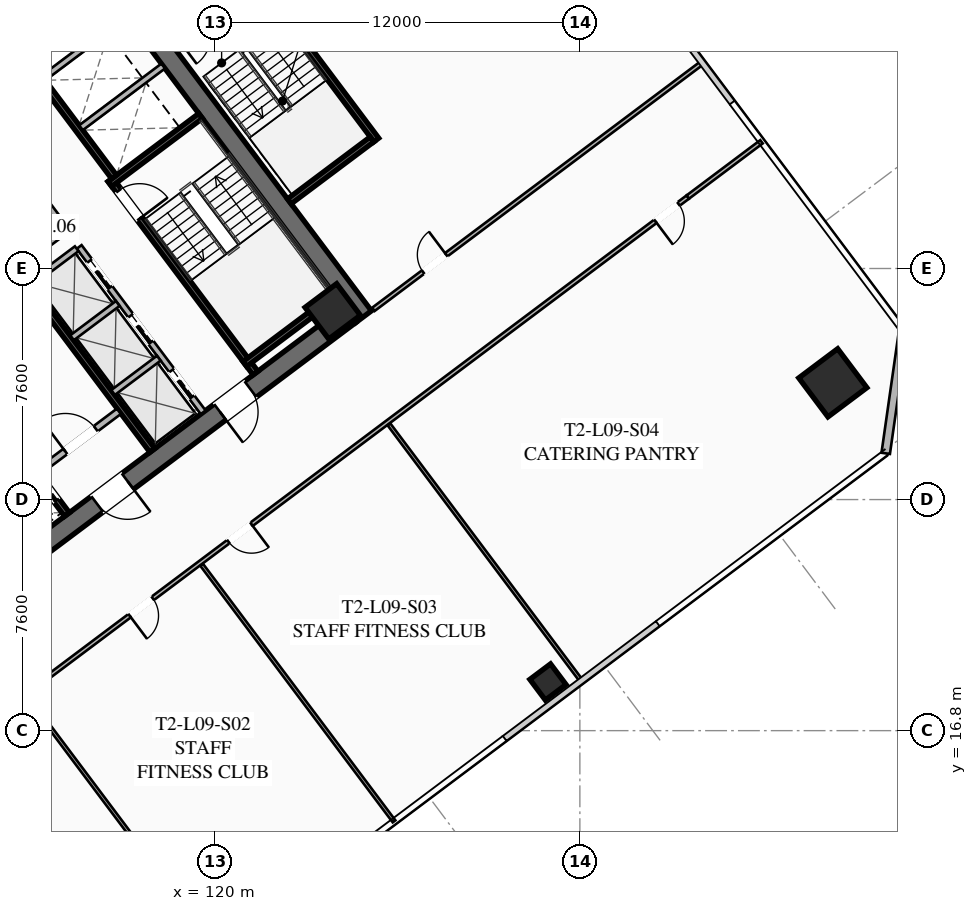
"""IFC4 building model, lengths in metres.
Left out: names, types, materials, properties, quantities, classifications, styles, units other than length and angle.
Written with IfcOpenShell. Run it as: python <this file> out.ifc"""

import sys

from ifc_helpers import new_model, si_unit, direction, frame, frame_2d, origin, origin_2d, place, context, subcontext, project, spatial, rectangle, hollow_rectangle, extrude, element, fill, save


model = new_model("IFC4")
c1 = context("Model", 3, precision=1e-05, world=origin(), true_north=direction((0.0, 1.0)))
c2 = subcontext(c1, "Body", "Model", "MODEL_VIEW")
j1 = project(units=[si_unit("LENGTHUNIT", "METRE"), si_unit("PLANEANGLEUNIT", "RADIAN")], contexts=[c1])
p1 = place(None, origin())
s1 = spatial("IfcSite", under=j1, at=p1, CompositionType="ELEMENT")
p2 = place(p1, origin())
s2 = spatial("IfcBuilding", under=s1, at=p2, CompositionType="ELEMENT")
p3 = place(p2, frame((0.0, 0.0, 38.8)))
s3 = spatial("IfcBuildingStorey", under=s2, at=p3, CompositionType="ELEMENT", Elevation=38.8)
p4 = place(p3, frame((115.524, 42.893, 0.0), z_axis=(0.0, 0.0, 1.0), x_axis=(0.600005007985, -0.799996243986, 0.0)))
e1 = element("IfcWall", 1, at=p4, inside=s3, PredefinedType="SHEAR", context=c2, shape_type="SweptSolid", body=[
    extrude(rectangle(XDim=15.6, YDim=0.65, at=frame_2d((7.8, 0.0))), origin(), (0.0, 0.0, 1.0), 3.55),
])
p5 = place(p3, frame((124.429, 30.478, 0.0), z_axis=(0.0, 0.0, 1.0), x_axis=(-0.799998028465, -0.600002628705, 0.0)))
e2 = element("IfcWall", 2, at=p5, inside=s3, PredefinedType="SHEAR", context=c2, shape_type="SweptSolid", body=[
    extrude(rectangle(XDim=14.86, YDim=0.65, at=frame_2d((7.43, 0.0))), origin(), (0.0, 0.0, 1.0), 3.55),
])
p6 = place(p5, frame((9.13, 0.0, 0.0)))
e3 = element("IfcOpeningElement", 3, at=p6, cuts=e2, PredefinedType="OPENING", context=c2, shape_type="SweptSolid", body=[
    extrude(rectangle(XDim=1.25, YDim=2.25, at=frame_2d((0.625, 1.125))), frame((0.0, 0.335, 0.0), z_axis=(0.0, -1.0, 0.0), x_axis=(1.0, 0.0, 0.0)), (0.0, 0.0, 1.0), 0.67),
])
p7 = place(p5, frame((4.08, 0.0, 0.0)))
e4 = element("IfcOpeningElement", 4, at=p7, cuts=e2, PredefinedType="OPENING", context=c2, shape_type="SweptSolid", body=[
    extrude(rectangle(XDim=1.25, YDim=2.25, at=frame_2d((0.625, 1.125))), frame((0.0, 0.335, 0.0), z_axis=(0.0, -1.0, 0.0), x_axis=(1.0, 0.0, 0.0)), (0.0, 0.0, 1.0), 0.67),
])
p8 = place(p3, frame((103.571, 33.522, 0.0), z_axis=(0.0, 0.0, 1.0), x_axis=(0.799998028465, 0.600002628705, 0.0)))
e5 = element("IfcWall", 5, at=p8, inside=s3, PredefinedType="SHEAR", context=c2, shape_type="SweptSolid", body=[
    extrude(rectangle(XDim=14.86, YDim=0.65, at=frame_2d((7.43, 0.0))), origin(), (0.0, 0.0, 1.0), 3.55),
])
p9 = place(p8, frame((4.48, 0.0, 0.0)))
e6 = element("IfcOpeningElement", 6, at=p9, cuts=e5, PredefinedType="OPENING", context=c2, shape_type="SweptSolid", body=[
    extrude(rectangle(XDim=1.25, YDim=2.25, at=frame_2d((0.625, 1.125))), frame((0.0, 0.335, 0.0), z_axis=(0.0, -1.0, 0.0), x_axis=(1.0, 0.0, 0.0)), (0.0, 0.0, 1.0), 0.67),
])
p10 = place(p8, frame((9.53, 0.0, 0.0)))
e7 = element("IfcOpeningElement", 7, at=p10, cuts=e5, PredefinedType="OPENING", context=c2, shape_type="SweptSolid", body=[
    extrude(rectangle(XDim=1.25, YDim=2.25, at=frame_2d((0.625, 1.125))), frame((0.0, 0.335, 0.0), z_axis=(0.0, -1.0, 0.0), x_axis=(1.0, 0.0, 0.0)), (0.0, 0.0, 1.0), 0.67),
])
p11 = place(p3, frame((123.87, 30.59, 0.0), z_axis=(0.0, 0.0, 1.0), x_axis=(0.799999996291, 0.600000004945, 0.0)))
e8 = element("IfcColumn", 8, at=p11, inside=s3, PredefinedType="COLUMN", context=c2, shape_type="SweptSolid", body=[
    extrude(hollow_rectangle(XDim=1.3, YDim=1.3, WallThickness=0.05, at=origin_2d()), origin(), (0.0, 0.0, 1.0), 3.35),
])
p12 = place(p3, frame((140.32, 28.24, 0.0), z_axis=(0.0, 0.0, 1.0), x_axis=(0.799999996291, 0.600000004945, 0.0)))
e9 = element("IfcColumn", 9, at=p12, inside=s3, PredefinedType="COLUMN", context=c2, shape_type="SweptSolid", body=[
    extrude(hollow_rectangle(XDim=1.6, YDim=1.6, WallThickness=0.06, at=origin_2d()), origin(), (0.0, 0.0, 1.0), 3.35),
])
p13 = place(p3, frame((130.95, 18.4, 0.0), z_axis=(0.0, 0.0, 1.0), x_axis=(0.799999996291, 0.600000004945, 0.0)))
e10 = element("IfcColumn", 10, at=p13, inside=s3, PredefinedType="COLUMN", context=c2, shape_type="SweptSolid", body=[
    extrude(hollow_rectangle(XDim=0.85, YDim=0.85, WallThickness=0.035, at=origin_2d()), origin(), (0.0, 0.0, 1.0), 3.35),
])
p14 = place(p3, frame((142.64, 29.98, 0.0), z_axis=(0.0, 0.0, 1.0), x_axis=(-0.14137968631, -0.989955445613, 0.0)))
e11 = element("IfcWall", 11, at=p14, inside=s3, PredefinedType="SOLIDWALL", context=c2, shape_type="SweptSolid", body=[
    extrude(rectangle(XDim=4.101, YDim=0.28, at=frame_2d((2.051, 0.0))), origin(), (0.0, 0.0, 1.0), 3.35),
])
p15 = place(p3, frame((116.56, 34.92, 0.0), z_axis=(0.0, 0.0, 1.0), x_axis=(0.600009827119, -0.799992629566, 0.0)))
e12 = element("IfcWall", 12, at=p15, inside=s3, PredefinedType="SHEAR", context=c2, shape_type="SweptSolid", body=[
    extrude(rectangle(XDim=7.95, YDim=0.2, at=frame_2d((3.975, 0.0))), origin(), (0.0, 0.0, 1.0), 3.35),
])
p16 = place(p15, frame((0.45, 0.0, 0.0)))
e13 = element("IfcOpeningElement", 13, at=p16, cuts=e12, PredefinedType="OPENING", context=c2, shape_type="SweptSolid", body=[
    extrude(rectangle(XDim=1.15, YDim=2.2, at=frame_2d((0.575, 1.1))), frame((0.0, 0.11, 0.0), z_axis=(0.0, -1.0, 0.0), x_axis=(1.0, 0.0, 0.0)), (0.0, 0.0, 1.0), 0.22),
])
for number, where, z_axis, x_axis in (
    (14, (116.54, 34.78, 0.0), (0.0, 0.0, 1.0), (0.8, 0.6, 0.0)),
    (15, (120.98, 28.86, 0.0), (0.0, 0.0, 1.0), (0.8, 0.6, 0.0)),
):
    element("IfcWall", number, at=place(p3, frame(where, z_axis=z_axis, x_axis=x_axis)), inside=s3, PredefinedType="SHEAR", context=c2, shape_type="SweptSolid", body=[
        extrude(rectangle(XDim=3.73, YDim=0.2, at=frame_2d((1.865, 0.0))), origin(), (0.0, 0.0, 1.0), 3.35),
    ])
p17 = place(p3, frame((117.938, 26.016, 0.0), z_axis=(0.0, 0.0, 1.0), x_axis=(-0.600005463273, 0.799995902516, 0.0)))
e16 = element("IfcWall", 16, at=p17, inside=s3, PredefinedType="SHEAR", context=c2, shape_type="SweptSolid", body=[
    extrude(rectangle(XDim=14.3, YDim=0.2, at=frame_2d((7.15, 0.0))), origin(), (0.0, 0.0, 1.0), 3.35),
])
p18 = place(p3, frame((114.316, 25.412, 0.0), z_axis=(0.0, 0.0, 1.0), x_axis=(0.800018601094, 0.59997519774, 0.0)))
e17 = element("IfcWall", 17, at=p18, inside=s3, PredefinedType="SOLIDWALL", context=c2, shape_type="SweptSolid", body=[
    extrude(rectangle(XDim=3.15, YDim=0.22, at=frame_2d((1.575, 0.0))), origin(), (0.0, 0.0, 1.0), 2.703),
])
p19 = place(p18, frame((0.95, 0.0, 0.0)))
e18 = element("IfcOpeningElement", 18, at=p19, cuts=e17, PredefinedType="OPENING", context=c2, shape_type="SweptSolid", body=[
    extrude(rectangle(XDim=1.25, YDim=2.25, at=frame_2d((0.625, 1.125))), frame((0.0, 0.12, 0.0), z_axis=(0.0, -1.0, 0.0), x_axis=(1.0, 0.0, 0.0)), (0.0, 0.0, 1.0), 0.24),
])
p20 = place(p3, frame((115.13, 23.91, 0.0), z_axis=(0.0, 0.0, 1.0), x_axis=(-0.599975393228, 0.800018454488, 0.0)))
e19 = element("IfcWall", 19, at=p20, inside=s3, PredefinedType="SHEAR", context=c2, shape_type="SweptSolid", body=[
    extrude(rectangle(XDim=6.35, YDim=0.2, at=frame_2d((3.175, 0.0))), origin(), (0.0, 0.0, 1.0), 3.35),
])
p21 = place(p20, frame((4.775, 0.0, 0.0)))
e20 = element("IfcOpeningElement", 20, at=p21, cuts=e19, PredefinedType="OPENING", context=c2, shape_type="SweptSolid", body=[
    extrude(rectangle(XDim=1.3, YDim=2.25, at=frame_2d((0.65, 1.125))), frame((0.0, 0.11, 0.0), z_axis=(0.0, -1.0, 0.0), x_axis=(1.0, 0.0, 0.0)), (0.0, 0.0, 1.0), 0.22),
])
p22 = place(p20, frame((2.775, 0.0, 0.0)))
e21 = element("IfcOpeningElement", 21, at=p22, cuts=e19, PredefinedType="OPENING", context=c2, shape_type="SweptSolid", body=[
    extrude(rectangle(XDim=1.3, YDim=2.25, at=frame_2d((0.65, 1.125))), frame((0.0, 0.11, 0.0), z_axis=(0.0, -1.0, 0.0), x_axis=(1.0, 0.0, 0.0)), (0.0, 0.0, 1.0), 0.22),
])
p23 = place(p20, frame((0.575, 0.0, 0.0)))
e22 = element("IfcOpeningElement", 22, at=p23, cuts=e19, PredefinedType="OPENING", context=c2, shape_type="SweptSolid", body=[
    extrude(rectangle(XDim=1.3, YDim=2.25, at=frame_2d((0.65, 1.125))), frame((0.0, 0.11, 0.0), z_axis=(0.0, -1.0, 0.0), x_axis=(1.0, 0.0, 0.0)), (0.0, 0.0, 1.0), 0.22),
])
p24 = place(p3, frame((112.87, 40.09, 0.0), z_axis=(0.0, 0.0, 1.0), x_axis=(0.599975393228, -0.800018454488, 0.0)))
e23 = element("IfcWall", 23, at=p24, inside=s3, PredefinedType="SHEAR", context=c2, shape_type="SweptSolid", body=[
    extrude(rectangle(XDim=6.35, YDim=0.2, at=frame_2d((3.175, 0.0))), origin(), (0.0, 0.0, 1.0), 3.35),
])
for number, where, z_axis, x_axis in (
    (24, (115.59, 36.63, 0.0), (0.0, 0.0, 1.0), (0.8, 0.6, 0.0)),
    (25, (114.36, 38.27, 0.0), (0.0, 0.0, 1.0), (0.8, 0.6, 0.0)),
):
    element("IfcWall", number, at=place(p3, frame(where, z_axis=z_axis, x_axis=x_axis)), inside=s3, PredefinedType="SOLIDWALL", context=c2, shape_type="SweptSolid", body=[
        extrude(rectangle(XDim=3.38, YDim=0.2, at=frame_2d((1.69, 0.0))), origin(), (0.0, 0.0, 1.0), 3.35),
    ])
p25 = place(p3, frame((119.61, 27.27, 0.0), z_axis=(0.0, 0.0, 1.0), x_axis=(-0.600011488909, 0.79999138319, 0.0)))
e26 = element("IfcWall", 26, at=p25, inside=s3, PredefinedType="SOLIDWALL", context=c2, shape_type="SweptSolid", body=[
    extrude(rectangle(XDim=6.8, YDim=0.2, at=frame_2d((3.4, 0.0))), origin(), (0.0, 0.0, 1.0), 3.35),
])
p26 = place(p25, frame((0.625, 0.0, 0.0)))
e27 = element("IfcOpeningElement", 27, at=p26, cuts=e26, PredefinedType="OPENING", context=c2, shape_type="SweptSolid", body=[
    extrude(rectangle(XDim=1.1, YDim=2.2, at=frame_2d((0.55, 1.1))), frame((0.0, 0.11, 0.0), z_axis=(0.0, -1.0, 0.0), x_axis=(1.0, 0.0, 0.0)), (0.0, 0.0, 1.0), 0.22),
])
p27 = place(p25, frame((2.875, 0.0, 0.0)))
e28 = element("IfcOpeningElement", 28, at=p27, cuts=e26, PredefinedType="OPENING", context=c2, shape_type="SweptSolid", body=[
    extrude(rectangle(XDim=1.1, YDim=2.2, at=frame_2d((0.55, 1.1))), frame((0.0, 0.11, 0.0), z_axis=(0.0, -1.0, 0.0), x_axis=(1.0, 0.0, 0.0)), (0.0, 0.0, 1.0), 0.22),
])
p28 = place(p25, frame((5.125, 0.0, 0.0)))
e29 = element("IfcOpeningElement", 29, at=p28, cuts=e26, PredefinedType="OPENING", context=c2, shape_type="SweptSolid", body=[
    extrude(rectangle(XDim=1.1, YDim=2.2, at=frame_2d((0.55, 1.1))), frame((0.0, 0.11, 0.0), z_axis=(0.0, -1.0, 0.0), x_axis=(1.0, 0.0, 0.0)), (0.0, 0.0, 1.0), 0.22),
])
p29 = place(p3, frame((116.646, 27.922, 0.0), z_axis=(0.0, 0.0, 1.0), x_axis=(0.8, 0.6, 0.0)))
e30 = element("IfcWall", 30, at=p29, inside=s3, PredefinedType="SOLIDWALL", context=c2, shape_type="SweptSolid", body=[
    extrude(rectangle(XDim=1.88, YDim=0.2, at=frame_2d((0.94, 0.0))), origin(), (0.0, 0.0, 1.0), 3.35),
])
p30 = place(p3, frame((115.296, 29.722, 0.0), z_axis=(0.0, 0.0, 1.0), x_axis=(0.799984418148, 0.600020775241, 0.0)))
e31 = element("IfcWall", 31, at=p30, inside=s3, PredefinedType="SOLIDWALL", context=c2, shape_type="SweptSolid", body=[
    extrude(rectangle(XDim=1.88, YDim=0.2, at=frame_2d((0.94, 0.0))), origin(), (0.0, 0.0, 1.0), 3.35),
])
p31 = place(p3, frame((113.946, 31.522, 0.0), z_axis=(0.0, 0.0, 1.0), x_axis=(0.8, 0.6, 0.0)))
e32 = element("IfcWall", 32, at=p31, inside=s3, PredefinedType="SOLIDWALL", context=c2, shape_type="SweptSolid", body=[
    extrude(rectangle(XDim=1.88, YDim=0.2, at=frame_2d((0.94, 0.0))), origin(), (0.0, 0.0, 1.0), 3.35),
])
p32 = place(p3, frame((115.11, 33.27, 0.0), z_axis=(0.0, 0.0, 1.0), x_axis=(-0.600011488909, 0.79999138319, 0.0)))
e33 = element("IfcWall", 33, at=p32, inside=s3, PredefinedType="SOLIDWALL", context=c2, shape_type="SweptSolid", body=[
    extrude(rectangle(XDim=6.8, YDim=0.2, at=frame_2d((3.4, 0.0))), origin(), (0.0, 0.0, 1.0), 3.35),
])
p33 = place(p3, frame((113.526, 32.082, 0.0), z_axis=(0.0, 0.0, 1.0), x_axis=(0.800046745961, 0.599937666993, 0.0)))
e34 = element("IfcWall", 34, at=p33, inside=s3, PredefinedType="SOLIDWALL", context=c2, shape_type="SweptSolid", body=[
    extrude(rectangle(XDim=1.88, YDim=0.2, at=frame_2d((0.94, 0.0))), origin(), (0.0, 0.0, 1.0), 3.35),
])
p34 = place(p3, frame((125.304, 36.228, 0.0), z_axis=(0.0, 0.0, 1.0), x_axis=(-0.59998851072, 0.800008616831, 0.0)))
e35 = element("IfcWall", 35, at=p34, inside=s3, PredefinedType="SHEAR", context=c2, shape_type="SweptSolid", body=[
    extrude(rectangle(XDim=6.8, YDim=0.2, at=frame_2d((3.4, 0.0))), origin(), (0.0, 0.0, 1.0), 3.35),
])
p35 = place(p3, frame((122.444, 34.208, 0.0), z_axis=(0.0, 0.0, 1.0), x_axis=(0.79999138319, 0.600011488909, 0.0)))
e36 = element("IfcWall", 36, at=p35, inside=s3, PredefinedType="SHEAR", context=c2, shape_type="SweptSolid", body=[
    extrude(rectangle(XDim=3.4, YDim=0.2, at=frame_2d((1.7, 0.0))), origin(), (0.0, 0.0, 1.0), 3.35),
])
p36 = place(p3, frame((98.316, 33.862, 0.0), z_axis=(0.0, 0.0, 1.0), x_axis=(0.800001947934, 0.599997402746, 0.0)))
e37 = element("IfcWall", 37, at=p36, inside=s3, PredefinedType="PARTITIONING", context=c2, shape_type="SweptSolid", body=[
    extrude(rectangle(XDim=30.08, YDim=0.135, at=frame_2d((15.04, 0.0))), origin(), (0.0, 0.0, 1.0), 2.703),
])
p37 = place(p36, frame((0.3, 0.0, 0.0)))
e38 = element("IfcOpeningElement", 38, at=p37, cuts=e37, PredefinedType="OPENING", context=c2, shape_type="SweptSolid", body=[
    extrude(rectangle(XDim=0.95, YDim=2.05, at=frame_2d((0.475, 1.025))), frame((0.0, 0.077, 0.0), z_axis=(0.0, -1.0, 0.0), x_axis=(1.0, 0.0, 0.0)), (0.0, 0.0, 1.0), 0.155),
])
p38 = place(p36, frame((7.172, 0.0, 0.0)))
e39 = element("IfcOpeningElement", 39, at=p38, cuts=e37, PredefinedType="OPENING", context=c2, shape_type="SweptSolid", body=[
    extrude(rectangle(XDim=0.95, YDim=2.05, at=frame_2d((0.475, 1.025))), frame((0.0, 0.077, 0.0), z_axis=(0.0, -1.0, 0.0), x_axis=(1.0, 0.0, 0.0)), (0.0, 0.0, 1.0), 0.155),
])
p39 = place(p36, frame((11.218, 0.0, 0.0)))
e40 = element("IfcOpeningElement", 40, at=p39, cuts=e37, PredefinedType="OPENING", context=c2, shape_type="SweptSolid", body=[
    extrude(rectangle(XDim=0.95, YDim=2.05, at=frame_2d((0.475, 1.025))), frame((0.0, 0.077, 0.0), z_axis=(0.0, -1.0, 0.0), x_axis=(1.0, 0.0, 0.0)), (0.0, 0.0, 1.0), 0.155),
])
p40 = place(p36, frame((28.83, 0.0, 0.0)))
e41 = element("IfcOpeningElement", 41, at=p40, cuts=e37, PredefinedType="OPENING", context=c2, shape_type="SweptSolid", body=[
    extrude(rectangle(XDim=0.95, YDim=2.05, at=frame_2d((0.475, 1.025))), frame((0.0, 0.077, 0.0), z_axis=(0.0, -1.0, 0.0), x_axis=(1.0, 0.0, 0.0)), (0.0, 0.0, 1.0), 0.155),
])
p41 = place(p3, frame((135.55, 34.35, 0.0), z_axis=(0.0, 0.0, 1.0), x_axis=(-0.799998052067, -0.600002597235, 0.0)))
e42 = element("IfcWall", 42, at=p41, inside=s3, PredefinedType="PARTITIONING", context=c2, shape_type="SweptSolid", body=[
    extrude(rectangle(XDim=30.08, YDim=0.135, at=frame_2d((15.04, 0.0))), origin(), (0.0, 0.0, 1.0), 2.703),
])
p42 = place(p41, frame((28.75, 0.0, 0.0)))
e43 = element("IfcOpeningElement", 43, at=p42, cuts=e42, PredefinedType="OPENING", context=c2, shape_type="SweptSolid", body=[
    extrude(rectangle(XDim=0.95, YDim=2.05, at=frame_2d((0.475, 1.025))), frame((0.0, 0.077, 0.0), z_axis=(0.0, -1.0, 0.0), x_axis=(1.0, 0.0, 0.0)), (0.0, 0.0, 1.0), 0.155),
])
p43 = place(p41, frame((21.999, 0.0, 0.0)))
e44 = element("IfcOpeningElement", 44, at=p43, cuts=e42, PredefinedType="OPENING", context=c2, shape_type="SweptSolid", body=[
    extrude(rectangle(XDim=0.95, YDim=2.05, at=frame_2d((0.475, 1.025))), frame((0.0, 0.077, 0.0), z_axis=(0.0, -1.0, 0.0), x_axis=(1.0, 0.0, 0.0)), (0.0, 0.0, 1.0), 0.155),
])
p44 = place(p41, frame((17.939, 0.0, 0.0)))
e45 = element("IfcOpeningElement", 45, at=p44, cuts=e42, PredefinedType="OPENING", context=c2, shape_type="SweptSolid", body=[
    extrude(rectangle(XDim=0.95, YDim=2.05, at=frame_2d((0.475, 1.025))), frame((0.0, 0.077, 0.0), z_axis=(0.0, -1.0, 0.0), x_axis=(1.0, 0.0, 0.0)), (0.0, 0.0, 1.0), 0.155),
])
p45 = place(p41, frame((0.38, 0.0, 0.0)))
e46 = element("IfcOpeningElement", 46, at=p45, cuts=e42, PredefinedType="OPENING", context=c2, shape_type="SweptSolid", body=[
    extrude(rectangle(XDim=0.95, YDim=2.05, at=frame_2d((0.475, 1.025))), frame((0.0, 0.077, 0.0), z_axis=(0.0, -1.0, 0.0), x_axis=(1.0, 0.0, 0.0)), (0.0, 0.0, 1.0), 0.155),
])
p46 = place(p3, frame((135.55, 34.35, 0.0), z_axis=(0.0, 0.0, 1.0), x_axis=(0.800029006059, 0.599961323307, 0.0)))
e47 = element("IfcWall", 47, at=p46, inside=s3, PredefinedType="PARTITIONING", context=c2, shape_type="SweptSolid", body=[
    extrude(rectangle(XDim=3.03, YDim=0.135, at=frame_2d((1.515, 0.0))), origin(), (0.0, 0.0, 1.0), 2.703),
])
p47 = place(p3, frame((120.128, 9.496, 0.0), z_axis=(0.0, 0.0, 1.0), x_axis=(-0.599992594658, 0.800005553953, 0.0)))
e48 = element("IfcWall", 48, at=p47, inside=s3, PredefinedType="PARTITIONING", context=c2, shape_type="SweptSolid", body=[
    extrude(rectangle(XDim=10.55, YDim=0.11, at=frame_2d((5.275, 0.0))), origin(), (0.0, 0.0, 1.0), 2.703),
])
for number, where, z_axis, x_axis in (
    (49, (125.888, 13.816, 0.0), (0.0, 0.0, 1.0), (-0.6, 0.8, 0.0)),
    (50, (132.048, 18.436, 0.0), (0.0, 0.0, 1.0), (-0.6, 0.8, 0.0)),
):
    element("IfcWall", number, at=place(p3, frame(where, z_axis=z_axis, x_axis=x_axis)), inside=s3, PredefinedType="PARTITIONING", context=c2, shape_type="SweptSolid", body=[
        extrude(rectangle(XDim=10.55, YDim=0.11, at=frame_2d((5.275, 0.0))), origin(), (0.0, 0.0, 1.0), 2.703),
    ])
p48 = place(p3, frame((125.208, 30.656, 0.0), z_axis=(0.0, 0.0, 1.0), x_axis=(0.799995666112, 0.600005778473, 0.0)))
e51 = element("IfcWall", 51, at=p48, inside=s3, PredefinedType="PARTITIONING", context=c2, shape_type="SweptSolid", body=[
    extrude(rectangle(XDim=13.52, YDim=0.135, at=frame_2d((6.76, 0.0))), origin(), (0.0, 0.0, 1.0), 2.703),
])
p49 = place(p48, frame((2.045, 0.0, 0.0)))
e52 = element("IfcOpeningElement", 52, at=p49, cuts=e51, PredefinedType="OPENING", context=c2, shape_type="SweptSolid", body=[
    extrude(rectangle(XDim=0.95, YDim=2.05, at=frame_2d((0.475, 1.025))), frame((0.0, 0.077, 0.0), z_axis=(0.0, -1.0, 0.0), x_axis=(1.0, 0.0, 0.0)), (0.0, 0.0, 1.0), 0.155),
])
p50 = place(p6, origin())
e53 = element("IfcDoor", 53, at=p50, inside=s3, OperationType="SINGLE_SWING_LEFT", PredefinedType="DOOR", context=c2, shape_type="SweptSolid", body=[
    extrude(rectangle(XDim=1.25, YDim=2.25, at=frame_2d((0.625, 1.125))), frame((0.0, 0.025, 0.0), z_axis=(0.0, -1.0, 0.0), x_axis=(1.0, 0.0, 0.0)), (0.0, 0.0, 1.0), 0.05),
])
fill(e3, e53)
p51 = place(p7, origin())
e54 = element("IfcDoor", 54, at=p51, inside=s3, OperationType="SINGLE_SWING_RIGHT", PredefinedType="DOOR", context=c2, shape_type="SweptSolid", body=[
    extrude(rectangle(XDim=1.25, YDim=2.25, at=frame_2d((0.625, 1.125))), frame((0.0, 0.025, 0.0), z_axis=(0.0, -1.0, 0.0), x_axis=(1.0, 0.0, 0.0)), (0.0, 0.0, 1.0), 0.05),
])
fill(e4, e54)
p52 = place(p16, origin())
e55 = element("IfcDoor", 55, at=p52, inside=s3, OperationType="SINGLE_SWING_RIGHT", PredefinedType="DOOR", context=c2, shape_type="SweptSolid", body=[
    extrude(rectangle(XDim=1.15, YDim=2.2, at=frame_2d((0.575, 1.1))), frame((0.0, 0.025, 0.0), z_axis=(0.0, -1.0, 0.0), x_axis=(1.0, 0.0, 0.0)), (0.0, 0.0, 1.0), 0.05),
])
fill(e13, e55)
p53 = place(p19, origin())
e56 = element("IfcDoor", 56, at=p53, inside=s3, OperationType="SINGLE_SWING_LEFT", PredefinedType="DOOR", context=c2, shape_type="SweptSolid", body=[
    extrude(rectangle(XDim=1.25, YDim=2.25, at=frame_2d((0.625, 1.125))), frame((0.0, 0.025, 0.0), z_axis=(0.0, -1.0, 0.0), x_axis=(1.0, 0.0, 0.0)), (0.0, 0.0, 1.0), 0.05),
])
fill(e18, e56)
p54 = place(p43, origin())
e57 = element("IfcDoor", 57, at=p54, inside=s3, OperationType="SINGLE_SWING_RIGHT", PredefinedType="DOOR", context=c2, shape_type="SweptSolid", body=[
    extrude(rectangle(XDim=0.95, YDim=2.05, at=frame_2d((0.475, 1.025))), frame((0.0, 0.025, 0.0), z_axis=(0.0, -1.0, 0.0), x_axis=(1.0, 0.0, 0.0)), (0.0, 0.0, 1.0), 0.05),
])
fill(e44, e57)
p55 = place(p44, origin())
e58 = element("IfcDoor", 58, at=p55, inside=s3, OperationType="SINGLE_SWING_LEFT", PredefinedType="DOOR", context=c2, shape_type="SweptSolid", body=[
    extrude(rectangle(XDim=0.95, YDim=2.05, at=frame_2d((0.475, 1.025))), frame((0.0, 0.025, 0.0), z_axis=(0.0, -1.0, 0.0), x_axis=(1.0, 0.0, 0.0)), (0.0, 0.0, 1.0), 0.05),
])
fill(e45, e58)
p56 = place(p45, origin())
e59 = element("IfcDoor", 59, at=p56, inside=s3, OperationType="SINGLE_SWING_RIGHT", PredefinedType="DOOR", context=c2, shape_type="SweptSolid", body=[
    extrude(rectangle(XDim=0.95, YDim=2.05, at=frame_2d((0.475, 1.025))), frame((0.0, 0.025, 0.0), z_axis=(0.0, -1.0, 0.0), x_axis=(1.0, 0.0, 0.0)), (0.0, 0.0, 1.0), 0.05),
])
fill(e46, e59)
p57 = place(p49, origin())
e60 = element("IfcDoor", 60, at=p57, inside=s3, OperationType="SINGLE_SWING_RIGHT", PredefinedType="DOOR", context=c2, shape_type="SweptSolid", body=[
    extrude(rectangle(XDim=0.95, YDim=2.05, at=frame_2d((0.475, 1.025))), frame((0.0, 0.025, 0.0), z_axis=(0.0, -1.0, 0.0), x_axis=(1.0, 0.0, 0.0)), (0.0, 0.0, 1.0), 0.05),
])
fill(e52, e60)
p58 = place(p23, origin())
e61 = element("IfcDoor", 61, at=p58, inside=s3, OperationType="SLIDING_TO_LEFT", PredefinedType="DOOR", context=c2, shape_type="SweptSolid", body=[
    extrude(rectangle(XDim=1.3, YDim=2.25, at=frame_2d((0.65, 1.125))), frame((0.0, 0.025, 0.0), z_axis=(0.0, -1.0, 0.0), x_axis=(1.0, 0.0, 0.0)), (0.0, 0.0, 1.0), 0.05),
])
fill(e22, e61)
p59 = place(p26, origin())
e62 = element("IfcDoor", 62, at=p59, inside=s3, OperationType="SLIDING_TO_LEFT", PredefinedType="DOOR", context=c2, shape_type="SweptSolid", body=[
    extrude(rectangle(XDim=1.1, YDim=2.2, at=frame_2d((0.55, 1.1))), frame((0.0, 0.025, 0.0), z_axis=(0.0, -1.0, 0.0), x_axis=(1.0, 0.0, 0.0)), (0.0, 0.0, 1.0), 0.05),
])
fill(e27, e62)
p60 = place(p27, origin())
e63 = element("IfcDoor", 63, at=p60, inside=s3, OperationType="SLIDING_TO_LEFT", PredefinedType="DOOR", context=c2, shape_type="SweptSolid", body=[
    extrude(rectangle(XDim=1.1, YDim=2.2, at=frame_2d((0.55, 1.1))), frame((0.0, 0.025, 0.0), z_axis=(0.0, -1.0, 0.0), x_axis=(1.0, 0.0, 0.0)), (0.0, 0.0, 1.0), 0.05),
])
fill(e28, e63)
p61 = place(p28, origin())
e64 = element("IfcDoor", 64, at=p61, inside=s3, OperationType="SLIDING_TO_LEFT", PredefinedType="DOOR", context=c2, shape_type="SweptSolid", body=[
    extrude(rectangle(XDim=1.1, YDim=2.2, at=frame_2d((0.55, 1.1))), frame((0.0, 0.025, 0.0), z_axis=(0.0, -1.0, 0.0), x_axis=(1.0, 0.0, 0.0)), (0.0, 0.0, 1.0), 0.05),
])
fill(e29, e64)
save(model, sys.argv[1])
